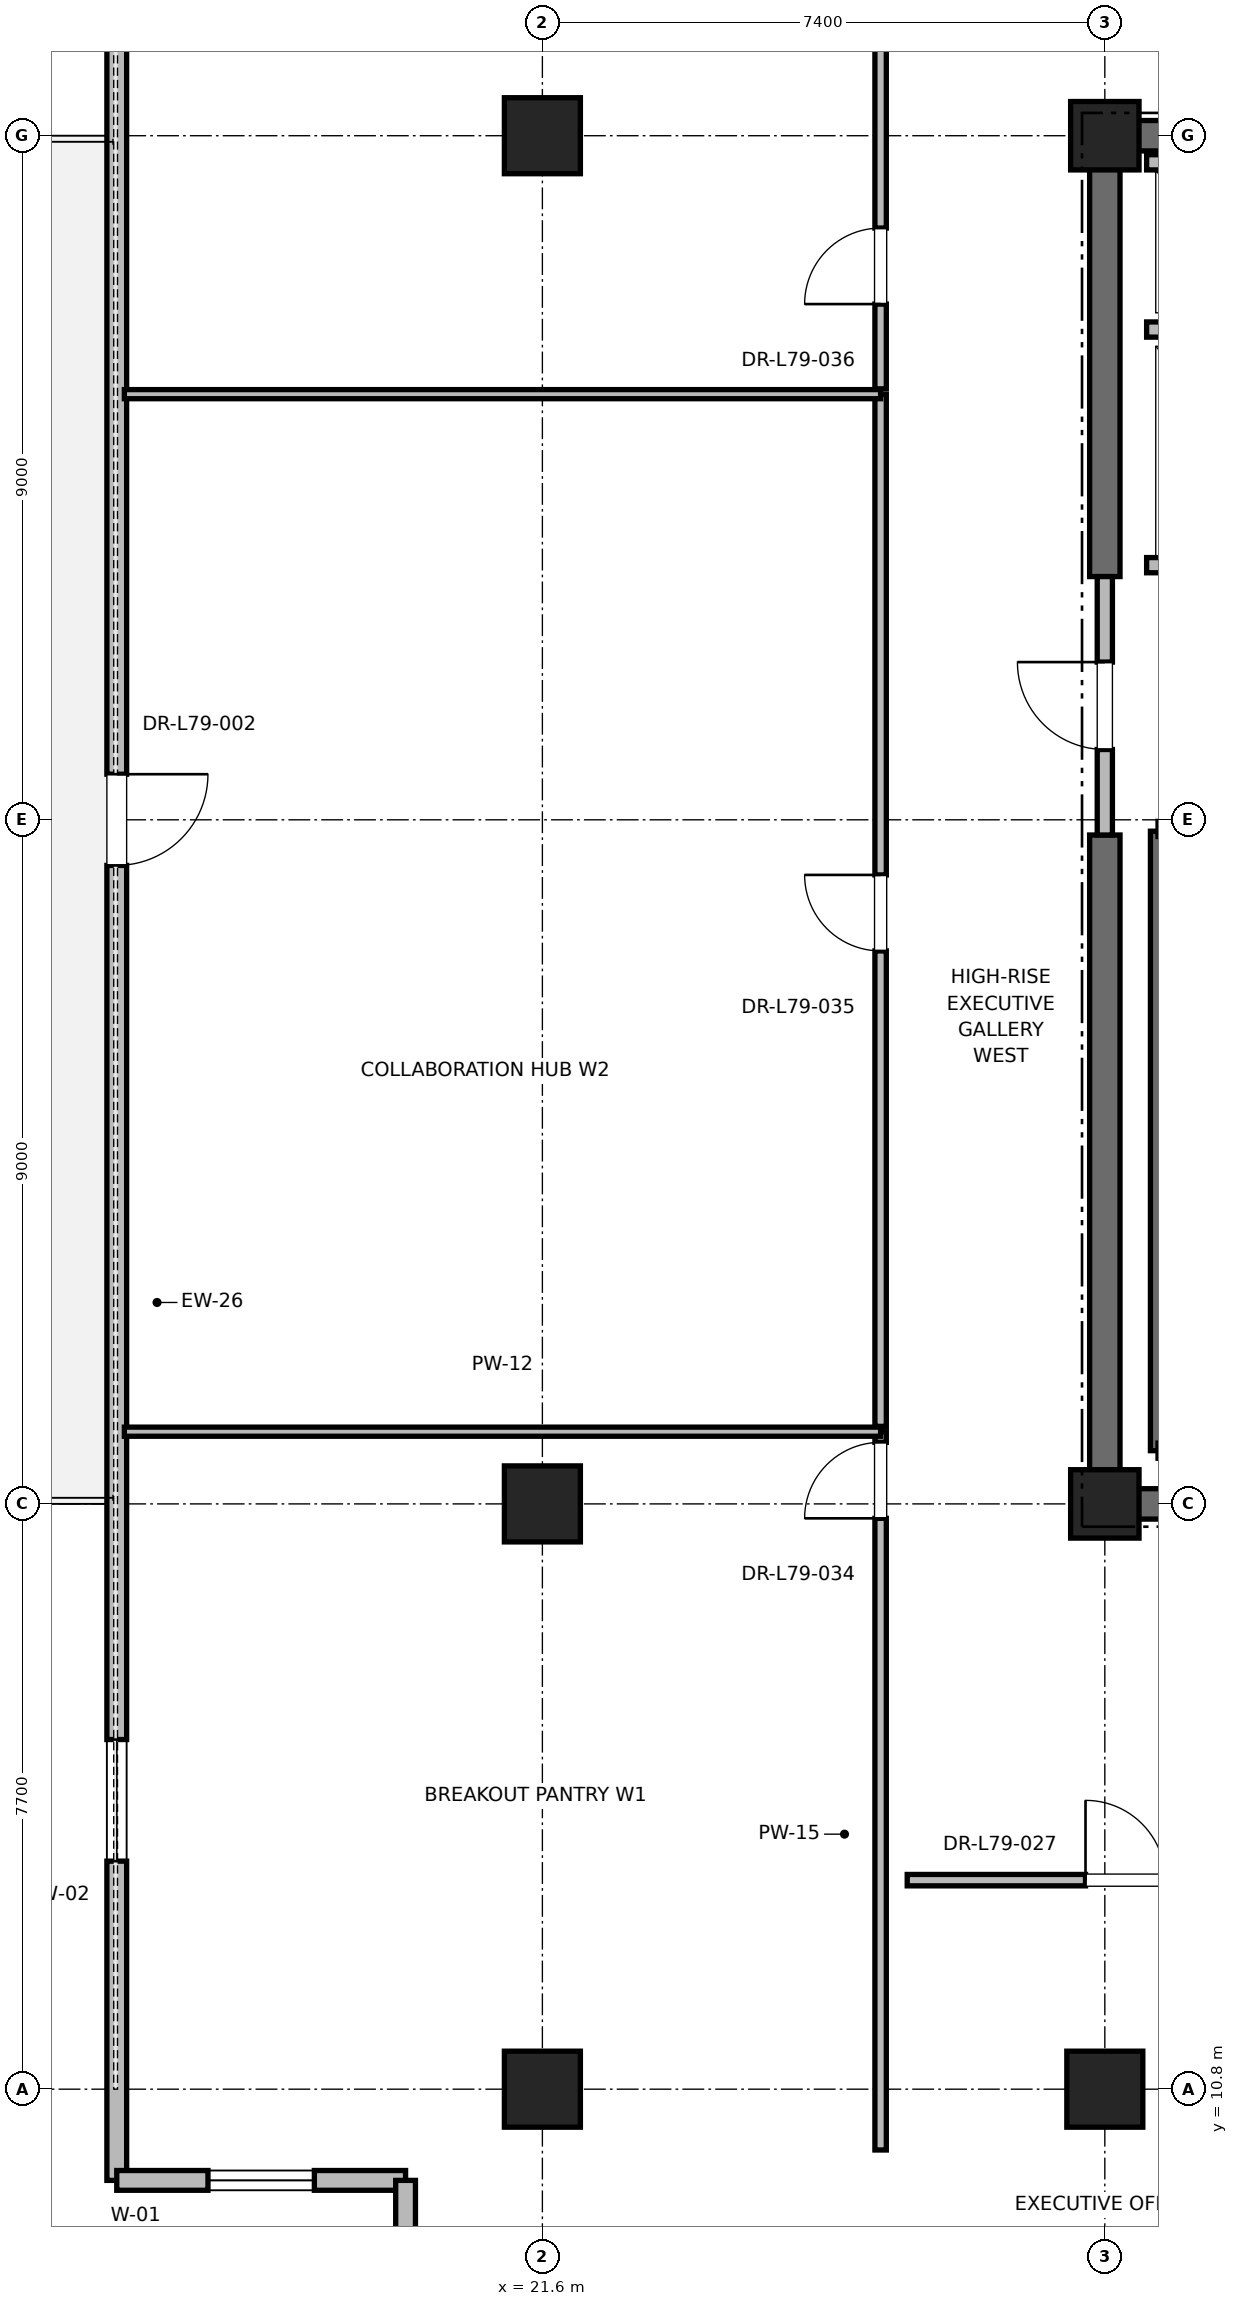
"""IFC4 building model, lengths in metres.
Left out: names, types, materials, properties, quantities, classifications, styles, units other than length and angle.
Written with IfcOpenShell. Run it as: python <this file> out.ifc"""

import sys

from ifc_helpers import new_model, si_unit, direction, frame, frame_2d, origin, origin_2d, place, context, subcontext, project, spatial, rectangle, extrude, element, fill, save


model = new_model("IFC4")
c1 = context("Model", 3, precision=1e-05, world=origin(), true_north=direction((0.0, 1.0)))
c2 = subcontext(c1, "Body", "Model", "MODEL_VIEW")
j1 = project(units=[si_unit("LENGTHUNIT", "METRE"), si_unit("PLANEANGLEUNIT", "RADIAN")], contexts=[c1])
p1 = place(None, origin())
s1 = spatial("IfcSite", under=j1, at=p1, CompositionType="ELEMENT")
p2 = place(p1, origin())
s2 = spatial("IfcBuilding", under=s1, at=p2, CompositionType="ELEMENT")
p3 = place(p2, frame((0.0, 0.0, 338.8)))
s3 = spatial("IfcBuildingStorey", under=s2, at=p3, CompositionType="ELEMENT", Elevation=338.8)
for number, where, z_axis, x_axis in (
    (1, (29.0, 10.8, 0.0), (0.0, 0.0, 1.0), (1.0, 0.0, 0.0)),
    (2, (21.6, 18.5, 0.0), (0.0, 0.0, 1.0), (1.0, 0.0, 0.0)),
    (3, (21.6, 36.5, 0.0), (0.0, 0.0, 1.0), (1.0, 0.0, 0.0)),
    (4, (21.6, 10.8, 0.0), (0.0, 0.0, 1.0), (1.0, 0.0, 0.0)),
):
    element("IfcColumn", number, at=place(p3, frame(where, z_axis=z_axis, x_axis=x_axis)), inside=s3, PredefinedType="COLUMN", context=c2, shape_type="SweptSolid", body=[
        extrude(rectangle(XDim=1.0, YDim=1.0, at=origin_2d()), origin(), (0.0, 0.0, 1.0), 4.0),
    ])
for number, where, z_axis, x_axis in (
    (5, (29.0, 18.5, 0.0), (0.0, 0.0, 1.0), (1.0, 0.0, 0.0)),
    (6, (29.0, 36.5, 0.0), (0.0, 0.0, 1.0), (1.0, 0.0, 0.0)),
):
    element("IfcColumn", number, at=place(p3, frame(where, z_axis=z_axis, x_axis=x_axis)), inside=s3, PredefinedType="PILASTER", context=c2, shape_type="SweptSolid", body=[
        extrude(rectangle(XDim=0.9, YDim=0.9, at=origin_2d()), origin(), (0.0, 0.0, 1.0), 4.0),
    ])
p4 = place(p3, frame((29.0, 18.5, 0.0), z_axis=(0.0, 0.0, 1.0), x_axis=(1.0, 0.0, 0.0)))
e7 = element("IfcWall", 7, at=p4, inside=s3, PredefinedType="SHEAR", context=c2, shape_type="SweptSolid", body=[
    extrude(rectangle(XDim=9.2, YDim=0.4, at=frame_2d((4.6, 0.0))), origin(), (0.0, 0.0, 1.0), 3.7),
])
p5 = place(p3, frame((29.0, 36.5, 0.0), z_axis=(0.0, 0.0, 1.0), x_axis=(1.0, 0.0, 0.0)))
e8 = element("IfcWall", 8, at=p5, inside=s3, PredefinedType="SHEAR", context=c2, shape_type="SweptSolid", body=[
    extrude(rectangle(XDim=5.8, YDim=0.4, at=frame_2d((2.9, 0.0))), origin(), (0.0, 0.0, 1.0), 3.7),
])
p6 = place(p3, frame((29.0, 18.5, 0.0), z_axis=(0.0, 0.0, 1.0), x_axis=(0.0, 1.0, 0.0)))
e9 = element("IfcWall", 9, at=p6, inside=s3, PredefinedType="SHEAR", context=c2, shape_type="SweptSolid", body=[
    extrude(rectangle(XDim=8.8, YDim=0.4, at=frame_2d((4.4, 0.0))), origin(), (0.0, 0.0, 1.0), 3.7),
])
p7 = place(p3, frame((29.0, 30.7, 0.0), z_axis=(0.0, 0.0, 1.0), x_axis=(0.0, 1.0, 0.0)))
e10 = element("IfcWall", 10, at=p7, inside=s3, PredefinedType="SHEAR", context=c2, shape_type="SweptSolid", body=[
    extrude(rectangle(XDim=5.8, YDim=0.4, at=frame_2d((2.9, 0.0))), origin(), (0.0, 0.0, 1.0), 3.7),
])
p8 = place(p3, frame((16.0, 45.4, 0.0), z_axis=(0.0, 0.0, 1.0), x_axis=(0.0, -1.0, 0.0)))
e11 = element("IfcWall", 11, at=p8, inside=s3, PredefinedType="PARAPET", context=c2, shape_type="SweptSolid", body=[
    extrude(rectangle(XDim=35.8, YDim=0.26, at=frame_2d((17.9, 0.0))), origin(), (0.0, 0.0, 1.0), 3.7),
])
p9 = place(p8, frame((4.2, 0.0, 0.85)))
e12 = element("IfcOpeningElement", 12, at=p9, cuts=e11, PredefinedType="OPENING", context=c2, shape_type="SweptSolid", body=[
    extrude(rectangle(XDim=1.6, YDim=2.1, at=frame_2d((0.8, 1.05))), frame((0.0, 0.13, 0.0), z_axis=(0.0, -1.0, 0.0), x_axis=(1.0, 0.0, 0.0)), (0.0, 0.0, 1.0), 0.26),
])
p10 = place(p8, frame((17.3, 0.0, 0.0)))
e13 = element("IfcOpeningElement", 13, at=p10, cuts=e11, PredefinedType="OPENING", context=c2, shape_type="SweptSolid", body=[
    extrude(rectangle(XDim=1.2, YDim=2.2, at=frame_2d((0.6, 1.1))), frame((0.0, 0.13, 0.0), z_axis=(0.0, -1.0, 0.0), x_axis=(1.0, 0.0, 0.0)), (0.0, 0.0, 1.0), 0.26),
])
p11 = place(p8, frame((30.0, 0.0, 0.85)))
e14 = element("IfcOpeningElement", 14, at=p11, cuts=e11, PredefinedType="OPENING", context=c2, shape_type="SweptSolid", body=[
    extrude(rectangle(XDim=1.6, YDim=2.1, at=frame_2d((0.8, 1.05))), frame((0.0, 0.13, 0.0), z_axis=(0.0, -1.0, 0.0), x_axis=(1.0, 0.0, 0.0)), (0.0, 0.0, 1.0), 0.26),
])
p12 = place(p3, frame((16.0, 9.6, 0.0), z_axis=(0.0, 0.0, 1.0), x_axis=(1.0, 0.0, 0.0)))
e15 = element("IfcWall", 15, at=p12, inside=s3, PredefinedType="PARAPET", context=c2, shape_type="SweptSolid", body=[
    extrude(rectangle(XDim=3.8, YDim=0.26, at=frame_2d((1.9, 0.0))), origin(), (0.0, 0.0, 1.0), 3.7),
])
p13 = place(p12, frame((1.2, 0.0, 0.85)))
e16 = element("IfcOpeningElement", 16, at=p13, cuts=e15, PredefinedType="OPENING", context=c2, shape_type="SweptSolid", body=[
    extrude(rectangle(XDim=1.4, YDim=2.0, at=frame_2d((0.7, 1.0))), frame((0.0, 0.13, 0.0), z_axis=(0.0, -1.0, 0.0), x_axis=(1.0, 0.0, 0.0)), (0.0, 0.0, 1.0), 0.26),
])
p14 = place(p3, frame((19.8, 9.6, 0.0), z_axis=(0.0, 0.0, 1.0), x_axis=(0.0, -1.0, 0.0)))
e17 = element("IfcWall", 17, at=p14, inside=s3, PredefinedType="PARAPET", context=c2, shape_type="SweptSolid", body=[
    extrude(rectangle(XDim=3.3, YDim=0.26, at=frame_2d((1.65, 0.0))), origin(), (0.0, 0.0, 1.0), 3.7),
])
p15 = place(p3, frame((29.7, 19.2, 0.0), z_axis=(0.0, 0.0, 1.0), x_axis=(0.0, 1.0, 0.0)))
e18 = element("IfcWall", 18, at=p15, inside=s3, PredefinedType="SOLIDWALL", context=c2, shape_type="SweptSolid", body=[
    extrude(rectangle(XDim=8.15, YDim=0.2, at=frame_2d((4.075, 0.0))), origin(), (0.0, 0.0, 1.0), 3.7),
])
p16 = place(p3, frame((29.0, 27.3, 0.0), z_axis=(0.0, 0.0, 1.0), x_axis=(0.0, 1.0, 0.0)))
e19 = element("IfcWall", 19, at=p16, inside=s3, PredefinedType="PARTITIONING", context=c2, shape_type="SweptSolid", body=[
    extrude(rectangle(XDim=3.4, YDim=0.2, at=frame_2d((1.7, 0.0))), origin(), (0.0, 0.0, 1.0), 2.78),
])
p17 = place(p16, frame((1.125, 0.0, 0.0)))
e20 = element("IfcOpeningElement", 20, at=p17, cuts=e19, PredefinedType="OPENING", context=c2, shape_type="SweptSolid", body=[
    extrude(rectangle(XDim=1.15, YDim=2.2, at=frame_2d((0.575, 1.1))), frame((0.0, 0.1, 0.0), z_axis=(0.0, -1.0, 0.0), x_axis=(1.0, 0.0, 0.0)), (0.0, 0.0, 1.0), 0.2),
])
p18 = place(p3, frame((29.55, 30.85, 0.0), z_axis=(0.0, 0.0, 1.0), x_axis=(1.0, 0.0, 0.0)))
e21 = element("IfcWall", 21, at=p18, inside=s3, PredefinedType="SOLIDWALL", context=c2, shape_type="SweptSolid", body=[
    extrude(rectangle(XDim=2.6, YDim=0.2, at=frame_2d((1.3, 0.0))), origin(), (0.0, 0.0, 1.0), 2.78),
])
p19 = place(p18, frame((0.75, 0.0, 0.0)))
e22 = element("IfcOpeningElement", 22, at=p19, cuts=e21, PredefinedType="OPENING", context=c2, shape_type="SweptSolid", body=[
    extrude(rectangle(XDim=1.1, YDim=2.2, at=frame_2d((0.55, 1.1))), frame((0.0, 0.1, 0.0), z_axis=(0.0, -1.0, 0.0), x_axis=(1.0, 0.0, 0.0)), (0.0, 0.0, 1.0), 0.2),
])
p20 = place(p3, frame((29.55, 33.95, 0.0), z_axis=(0.0, 0.0, 1.0), x_axis=(1.0, 0.0, 0.0)))
e23 = element("IfcWall", 23, at=p20, inside=s3, PredefinedType="SOLIDWALL", context=c2, shape_type="SweptSolid", body=[
    extrude(rectangle(XDim=2.8, YDim=0.2, at=frame_2d((1.4, 0.0))), origin(), (0.0, 0.0, 1.0), 3.7),
])
p21 = place(p3, frame((32.35, 36.15, 0.0), z_axis=(0.0, 0.0, 1.0), x_axis=(-1.0, 0.0, 0.0)))
e24 = element("IfcWall", 24, at=p21, inside=s3, PredefinedType="SOLIDWALL", context=c2, shape_type="SweptSolid", body=[
    extrude(rectangle(XDim=2.8, YDim=0.2, at=frame_2d((1.4, 0.0))), origin(), (0.0, 0.0, 1.0), 2.753),
])
p22 = place(p3, frame((26.4, 13.55, 0.0), z_axis=(0.0, 0.0, 1.0), x_axis=(1.0, 0.0, 0.0)))
e25 = element("IfcWall", 25, at=p22, inside=s3, PredefinedType="PARTITIONING", context=c2, shape_type="SweptSolid", body=[
    extrude(rectangle(XDim=5.712, YDim=0.15, at=frame_2d((2.856, 0.0))), origin(), (0.0, 0.0, 1.0), 2.753),
])
p23 = place(p22, frame((2.346, 0.0, 0.0)))
e26 = element("IfcOpeningElement", 26, at=p23, cuts=e25, PredefinedType="OPENING", context=c2, shape_type="SweptSolid", body=[
    extrude(rectangle(XDim=1.05, YDim=2.2, at=frame_2d((0.525, 1.1))), frame((0.0, 0.075, 0.0), z_axis=(0.0, -1.0, 0.0), x_axis=(1.0, 0.0, 0.0)), (0.0, 0.0, 1.0), 0.15),
])
p24 = place(p3, frame((26.05, 10.0, 0.0), z_axis=(0.0, 0.0, 1.0), x_axis=(0.0, 1.0, 0.0)))
e27 = element("IfcWall", 27, at=p24, inside=s3, PredefinedType="PARTITIONING", context=c2, shape_type="SweptSolid", body=[
    extrude(rectangle(XDim=9.45, YDim=0.15, at=frame_2d((4.725, 0.0))), origin(), (0.0, 0.0, 1.0), 2.753),
])
p25 = place(p24, frame((8.31, 0.0, 0.0)))
e28 = element("IfcOpeningElement", 28, at=p25, cuts=e27, PredefinedType="OPENING", context=c2, shape_type="SweptSolid", body=[
    extrude(rectangle(XDim=1.0, YDim=2.15, at=frame_2d((0.5, 1.075))), frame((0.0, 0.075, 0.0), z_axis=(0.0, -1.0, 0.0), x_axis=(1.0, 0.0, 0.0)), (0.0, 0.0, 1.0), 0.15),
])
p26 = place(p3, frame((16.1, 19.45, 0.0), z_axis=(0.0, 0.0, 1.0), x_axis=(1.0, 0.0, 0.0)))
e29 = element("IfcWall", 29, at=p26, inside=s3, PredefinedType="PARTITIONING", context=c2, shape_type="SweptSolid", body=[
    extrude(rectangle(XDim=9.95, YDim=0.12, at=frame_2d((4.975, 0.0))), origin(), (0.0, 0.0, 1.0), 2.753),
])
p27 = place(p3, frame((26.05, 19.52, 0.0), z_axis=(0.0, 0.0, 1.0), x_axis=(0.0, 1.0, 0.0)))
e30 = element("IfcWall", 30, at=p27, inside=s3, PredefinedType="PARTITIONING", context=c2, shape_type="SweptSolid", body=[
    extrude(rectangle(XDim=13.58, YDim=0.15, at=frame_2d((6.79, 0.0))), origin(), (0.0, 0.0, 1.0), 2.85),
])
p28 = place(p27, frame((6.255, 0.0, 0.0)))
e31 = element("IfcOpeningElement", 31, at=p28, cuts=e30, PredefinedType="OPENING", context=c2, shape_type="SweptSolid", body=[
    extrude(rectangle(XDim=1.0, YDim=2.15, at=frame_2d((0.5, 1.075))), frame((0.0, 0.075, 0.0), z_axis=(0.0, -1.0, 0.0), x_axis=(1.0, 0.0, 0.0)), (0.0, 0.0, 1.0), 0.15),
])
p29 = place(p3, frame((16.1, 33.1, 0.0), z_axis=(0.0, 0.0, 1.0), x_axis=(1.0, 0.0, 0.0)))
e32 = element("IfcWall", 32, at=p29, inside=s3, PredefinedType="PARTITIONING", context=c2, shape_type="SweptSolid", body=[
    extrude(rectangle(XDim=9.95, YDim=0.12, at=frame_2d((4.975, 0.0))), origin(), (0.0, 0.0, 1.0), 2.753),
])
p30 = place(p3, frame((26.05, 33.17, 0.0), z_axis=(0.0, 0.0, 1.0), x_axis=(0.0, 1.0, 0.0)))
e33 = element("IfcWall", 33, at=p30, inside=s3, PredefinedType="PARTITIONING", context=c2, shape_type="SweptSolid", body=[
    extrude(rectangle(XDim=11.83, YDim=0.15, at=frame_2d((5.915, 0.0))), origin(), (0.0, 0.0, 1.0), 2.753),
])
p31 = place(p30, frame((1.115, 0.0, 0.0)))
e34 = element("IfcOpeningElement", 34, at=p31, cuts=e33, PredefinedType="OPENING", context=c2, shape_type="SweptSolid", body=[
    extrude(rectangle(XDim=1.0, YDim=2.15, at=frame_2d((0.5, 1.075))), frame((0.0, 0.075, 0.0), z_axis=(0.0, -1.0, 0.0), x_axis=(1.0, 0.0, 0.0)), (0.0, 0.0, 1.0), 0.15),
])
p32 = place(p10, origin())
e35 = element("IfcDoor", 35, at=p32, inside=s3, OperationType="SINGLE_SWING_LEFT", PredefinedType="DOOR", context=c2, shape_type="SweptSolid", body=[
    extrude(rectangle(XDim=1.2, YDim=2.2, at=frame_2d((0.6, 1.1))), frame((0.0, 0.025, 0.0), z_axis=(0.0, -1.0, 0.0), x_axis=(1.0, 0.0, 0.0)), (0.0, 0.0, 1.0), 0.05),
])
fill(e13, e35)
p33 = place(p11, origin())
e36 = element("IfcWindow", 36, at=p33, inside=s3, PartitioningType="SINGLE_PANEL", PredefinedType="WINDOW", context=c2, shape_type="SweptSolid", body=[
    extrude(rectangle(XDim=1.6, YDim=2.1, at=frame_2d((0.8, 1.05))), frame((0.0, 0.03, 0.0), z_axis=(0.0, -1.0, 0.0), x_axis=(1.0, 0.0, 0.0)), (0.0, 0.0, 1.0), 0.06),
])
fill(e14, e36)
p34 = place(p13, origin())
e37 = element("IfcWindow", 37, at=p34, inside=s3, PartitioningType="SINGLE_PANEL", PredefinedType="WINDOW", context=c2, shape_type="SweptSolid", body=[
    extrude(rectangle(XDim=1.4, YDim=2.0, at=frame_2d((0.7, 1.0))), frame((0.0, 0.03, 0.0), z_axis=(0.0, -1.0, 0.0), x_axis=(1.0, 0.0, 0.0)), (0.0, 0.0, 1.0), 0.06),
])
fill(e16, e37)
p35 = place(p17, origin())
e38 = element("IfcDoor", 38, at=p35, inside=s3, OperationType="SINGLE_SWING_RIGHT", PredefinedType="DOOR", context=c2, shape_type="SweptSolid", body=[
    extrude(rectangle(XDim=1.15, YDim=2.2, at=frame_2d((0.575, 1.1))), frame((0.0, 0.025, 0.0), z_axis=(0.0, -1.0, 0.0), x_axis=(1.0, 0.0, 0.0)), (0.0, 0.0, 1.0), 0.05),
])
fill(e20, e38)
p36 = place(p23, origin())
e39 = element("IfcDoor", 39, at=p36, inside=s3, OperationType="SINGLE_SWING_LEFT", PredefinedType="DOOR", context=c2, shape_type="SweptSolid", body=[
    extrude(rectangle(XDim=1.05, YDim=2.2, at=frame_2d((0.525, 1.1))), frame((0.0, 0.025, 0.0), z_axis=(0.0, -1.0, 0.0), x_axis=(1.0, 0.0, 0.0)), (0.0, 0.0, 1.0), 0.05),
])
fill(e26, e39)
p37 = place(p25, origin())
e40 = element("IfcDoor", 40, at=p37, inside=s3, OperationType="SINGLE_SWING_LEFT", PredefinedType="DOOR", context=c2, shape_type="SweptSolid", body=[
    extrude(rectangle(XDim=1.0, YDim=2.15, at=frame_2d((0.5, 1.075))), frame((0.0, 0.025, 0.0), z_axis=(0.0, -1.0, 0.0), x_axis=(1.0, 0.0, 0.0)), (0.0, 0.0, 1.0), 0.05),
])
fill(e28, e40)
p38 = place(p28, origin())
e41 = element("IfcDoor", 41, at=p38, inside=s3, OperationType="SINGLE_SWING_RIGHT", PredefinedType="DOOR", context=c2, shape_type="SweptSolid", body=[
    extrude(rectangle(XDim=1.0, YDim=2.15, at=frame_2d((0.5, 1.075))), frame((0.0, 0.025, 0.0), z_axis=(0.0, -1.0, 0.0), x_axis=(1.0, 0.0, 0.0)), (0.0, 0.0, 1.0), 0.05),
])
fill(e31, e41)
p39 = place(p31, origin())
e42 = element("IfcDoor", 42, at=p39, inside=s3, OperationType="SINGLE_SWING_LEFT", PredefinedType="DOOR", context=c2, shape_type="SweptSolid", body=[
    extrude(rectangle(XDim=1.0, YDim=2.15, at=frame_2d((0.5, 1.075))), frame((0.0, 0.025, 0.0), z_axis=(0.0, -1.0, 0.0), x_axis=(1.0, 0.0, 0.0)), (0.0, 0.0, 1.0), 0.05),
])
fill(e34, e42)
save(model, sys.argv[1])
